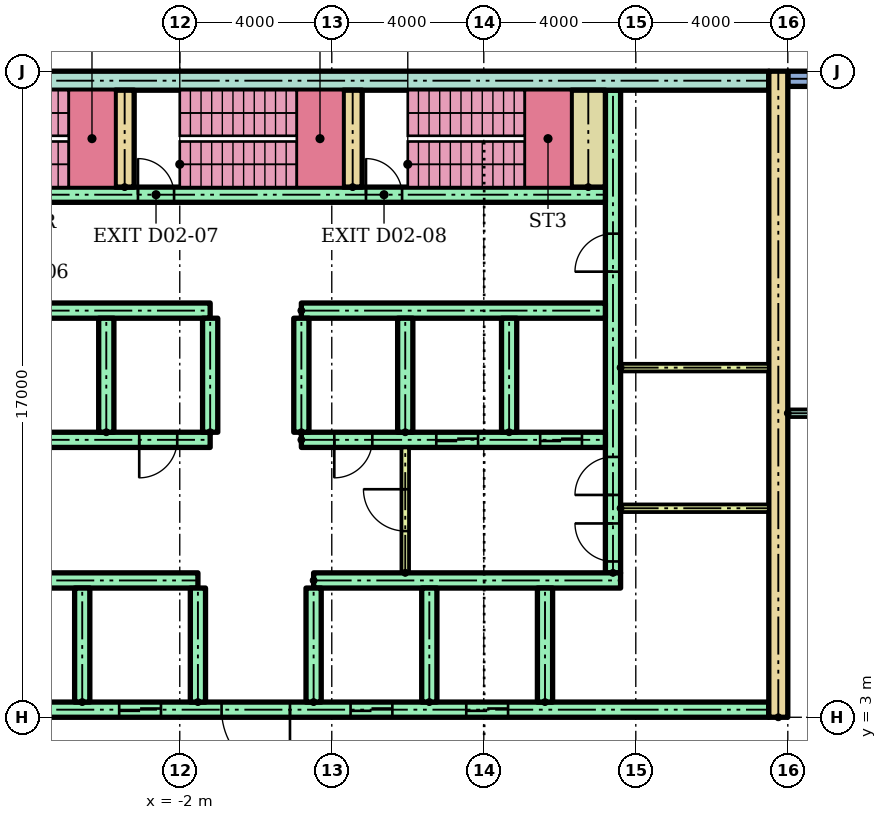
"""IFC4 building model, lengths in metres.
Left out: names, types, materials, properties, quantities, classifications, styles, units other than length and angle.
Written with IfcOpenShell. Run it as: python <this file> out.ifc"""

import sys

from ifc_helpers import new_model, si_unit, direction, frame, frame_2d, origin, place, context, subcontext, project, spatial, rectangle, extrude, element, fill, save


model = new_model("IFC4")
c1 = context("Model", 3, precision=1e-05, world=origin(), true_north=direction((0.0, 1.0)))
c2 = subcontext(c1, "Body", "Model", "MODEL_VIEW")
j1 = project(units=[si_unit("LENGTHUNIT", "METRE"), si_unit("PLANEANGLEUNIT", "RADIAN")], contexts=[c1])
p1 = place(None, origin())
s1 = spatial("IfcSite", under=j1, at=p1, CompositionType="ELEMENT")
p2 = place(p1, origin())
s2 = spatial("IfcBuilding", under=s1, at=p2, CompositionType="ELEMENT")
p3 = place(p2, frame((0.0, 0.0, 10.0)))
s3 = spatial("IfcBuildingStorey", under=s2, at=p3, CompositionType="ELEMENT", Elevation=10.0)
p4 = place(p3, frame((39.6, 19.8, 0.0), z_axis=(0.0, 0.0, 1.0), x_axis=(-1.0, 0.0, 0.0)))
e1 = element("IfcWall", 1, at=p4, inside=s3, PredefinedType="STANDARD", context=c2, shape_type="SweptSolid", body=[
    extrude(rectangle(XDim=25.6, YDim=0.4, at=frame_2d((12.8, 0.0))), origin(), (0.0, 0.0, 1.0), 3.7),
])
p5 = place(p4, frame((2.4, 0.0, 0.9)))
e2 = element("IfcOpeningElement", 2, at=p5, cuts=e1, PredefinedType="OPENING", context=c2, shape_type="SweptSolid", body=[
    extrude(rectangle(XDim=2.4, YDim=2.1, at=frame_2d((1.2, 1.05))), frame((0.0, 0.21, 0.0), z_axis=(0.0, -1.0, 0.0), x_axis=(1.0, 0.0, 0.0)), (0.0, 0.0, 1.0), 0.42),
])
p6 = place(p4, frame((10.135, 0.0, 0.9)))
e3 = element("IfcOpeningElement", 3, at=p6, cuts=e1, PredefinedType="OPENING", context=c2, shape_type="SweptSolid", body=[
    extrude(rectangle(XDim=2.4, YDim=2.1, at=frame_2d((1.2, 1.05))), frame((0.0, 0.21, 0.0), z_axis=(0.0, -1.0, 0.0), x_axis=(1.0, 0.0, 0.0)), (0.0, 0.0, 1.0), 0.42),
])
p7 = place(p4, frame((14.665, 0.0, 0.9)))
e4 = element("IfcOpeningElement", 4, at=p7, cuts=e1, PredefinedType="OPENING", context=c2, shape_type="SweptSolid", body=[
    extrude(rectangle(XDim=2.4, YDim=2.1, at=frame_2d((1.2, 1.05))), frame((0.0, 0.21, 0.0), z_axis=(0.0, -1.0, 0.0), x_axis=(1.0, 0.0, 0.0)), (0.0, 0.0, 1.0), 0.42),
])
p8 = place(p4, frame((18.135, 0.0, 0.9)))
e5 = element("IfcOpeningElement", 5, at=p8, cuts=e1, PredefinedType="OPENING", context=c2, shape_type="SweptSolid", body=[
    extrude(rectangle(XDim=2.4, YDim=2.1, at=frame_2d((1.2, 1.05))), frame((0.0, 0.21, 0.0), z_axis=(0.0, -1.0, 0.0), x_axis=(1.0, 0.0, 0.0)), (0.0, 0.0, 1.0), 0.42),
])
p9 = place(p4, frame((22.665, 0.0, 0.9)))
e6 = element("IfcOpeningElement", 6, at=p9, cuts=e1, PredefinedType="OPENING", context=c2, shape_type="SweptSolid", body=[
    extrude(rectangle(XDim=2.4, YDim=2.1, at=frame_2d((1.2, 1.05))), frame((0.0, 0.21, 0.0), z_axis=(0.0, -1.0, 0.0), x_axis=(1.0, 0.0, 0.0)), (0.0, 0.0, 1.0), 0.42),
])
p10 = place(p3, frame((13.75, 3.0, 0.0), z_axis=(0.0, 0.0, 1.0), x_axis=(0.0, 1.0, 0.0)))
e7 = element("IfcWall", 7, at=p10, inside=s3, PredefinedType="SHEAR", context=c2, shape_type="SweptSolid", body=[
    extrude(rectangle(XDim=17.0, YDim=0.5, at=frame_2d((8.5, 0.0))), origin(), (0.0, 0.0, 1.0), 3.7),
])
p11 = place(p3, frame((-13.5, 19.75, 0.0)))
e8 = element("IfcWall", 8, at=p11, inside=s3, PredefinedType="SHEAR", context=c2, shape_type="SweptSolid", body=[
    extrude(rectangle(XDim=27.0, YDim=0.5, at=frame_2d((13.5, 0.0))), origin(), (0.0, 0.0, 1.0), 3.7),
])
p12 = place(p3, frame((9.4, 6.8, 0.0), z_axis=(0.0, 0.0, 1.0), x_axis=(0.0, 1.0, 0.0)))
e9 = element("IfcWall", 9, at=p12, inside=s3, PredefinedType="SHEAR", context=c2, shape_type="SweptSolid", body=[
    extrude(rectangle(XDim=12.7, YDim=0.4, at=frame_2d((6.35, 0.0))), origin(), (0.0, 0.0, 1.0), 3.7),
])
p13 = place(p12, frame((0.3, 0.0, 0.0)))
e10 = element("IfcOpeningElement", 10, at=p13, cuts=e9, PredefinedType="OPENING", context=c2, shape_type="SweptSolid", body=[
    extrude(rectangle(XDim=1.0, YDim=2.1, at=frame_2d((0.5, 1.05))), frame((0.0, 0.21, 0.0), z_axis=(0.0, -1.0, 0.0), x_axis=(1.0, 0.0, 0.0)), (0.0, 0.0, 1.0), 0.42),
])
p14 = place(p12, frame((2.05, 0.0, 0.0)))
e11 = element("IfcOpeningElement", 11, at=p14, cuts=e9, PredefinedType="OPENING", context=c2, shape_type="SweptSolid", body=[
    extrude(rectangle(XDim=1.0, YDim=2.1, at=frame_2d((0.5, 1.05))), frame((0.0, 0.21, 0.0), z_axis=(0.0, -1.0, 0.0), x_axis=(1.0, 0.0, 0.0)), (0.0, 0.0, 1.0), 0.42),
])
p15 = place(p12, frame((7.925, 0.0, 0.0)))
e12 = element("IfcOpeningElement", 12, at=p15, cuts=e9, PredefinedType="OPENING", context=c2, shape_type="SweptSolid", body=[
    extrude(rectangle(XDim=1.0, YDim=2.1, at=frame_2d((0.5, 1.05))), frame((0.0, 0.21, 0.0), z_axis=(0.0, -1.0, 0.0), x_axis=(1.0, 0.0, 0.0)), (0.0, 0.0, 1.0), 0.42),
])
p16 = place(p3, frame((-13.5, 3.2, 0.0)))
e13 = element("IfcWall", 13, at=p16, inside=s3, PredefinedType="SHEAR", context=c2, shape_type="SweptSolid", body=[
    extrude(rectangle(XDim=27.0, YDim=0.4, at=frame_2d((13.5, 0.0))), origin(), (0.0, 0.0, 1.0), 3.7),
])
p17 = place(p16, frame((6.861, 0.0, 0.0)))
e14 = element("IfcOpeningElement", 14, at=p17, cuts=e13, PredefinedType="OPENING", context=c2, shape_type="SweptSolid", body=[
    extrude(rectangle(XDim=1.1, YDim=2.1, at=frame_2d((0.55, 1.05))), frame((0.0, 0.21, 0.0), z_axis=(0.0, -1.0, 0.0), x_axis=(1.0, 0.0, 0.0)), (0.0, 0.0, 1.0), 0.42),
])
p18 = place(p16, frame((9.906, 0.0, 0.0)))
e15 = element("IfcOpeningElement", 15, at=p18, cuts=e13, PredefinedType="OPENING", context=c2, shape_type="SweptSolid", body=[
    extrude(rectangle(XDim=1.1, YDim=2.1, at=frame_2d((0.55, 1.05))), frame((0.0, 0.21, 0.0), z_axis=(0.0, -1.0, 0.0), x_axis=(1.0, 0.0, 0.0)), (0.0, 0.0, 1.0), 0.42),
])
p19 = place(p16, frame((15.994, 0.0, 0.0)))
e16 = element("IfcOpeningElement", 16, at=p19, cuts=e13, PredefinedType="OPENING", context=c2, shape_type="SweptSolid", body=[
    extrude(rectangle(XDim=1.1, YDim=2.1, at=frame_2d((0.55, 1.05))), frame((0.0, 0.21, 0.0), z_axis=(0.0, -1.0, 0.0), x_axis=(1.0, 0.0, 0.0)), (0.0, 0.0, 1.0), 0.42),
])
p20 = place(p16, frame((19.039, 0.0, 0.0)))
e17 = element("IfcOpeningElement", 17, at=p20, cuts=e13, PredefinedType="OPENING", context=c2, shape_type="SweptSolid", body=[
    extrude(rectangle(XDim=1.1, YDim=2.1, at=frame_2d((0.55, 1.05))), frame((0.0, 0.21, 0.0), z_axis=(0.0, -1.0, 0.0), x_axis=(1.0, 0.0, 0.0)), (0.0, 0.0, 1.0), 0.42),
])
p21 = place(p16, frame((12.6, 0.0, 0.0)))
e18 = element("IfcOpeningElement", 18, at=p21, cuts=e13, PredefinedType="OPENING", context=c2, shape_type="SweptSolid", body=[
    extrude(rectangle(XDim=1.8, YDim=2.1, at=frame_2d((0.9, 1.05))), frame((0.0, 0.21, 0.0), z_axis=(0.0, -1.0, 0.0), x_axis=(1.0, 0.0, 0.0)), (0.0, 0.0, 1.0), 0.42),
])
p22 = place(p3, frame((-13.5, 6.6, 0.0)))
e19 = element("IfcWall", 19, at=p22, inside=s3, PredefinedType="SHEAR", context=c2, shape_type="SweptSolid", body=[
    extrude(rectangle(XDim=11.978, YDim=0.4, at=frame_2d((5.989, 0.0))), origin(), (0.0, 0.0, 1.0), 3.7),
])
p23 = place(p3, frame((1.522, 6.6, 0.0)))
e20 = element("IfcWall", 20, at=p23, inside=s3, PredefinedType="SHEAR", context=c2, shape_type="SweptSolid", body=[
    extrude(rectangle(XDim=8.078, YDim=0.4, at=frame_2d((4.039, 0.0))), origin(), (0.0, 0.0, 1.0), 3.7),
])
for number, where, z_axis, x_axis in (
    (21, (-4.567, 3.4, 0.0), (0.0, 0.0, 1.0), (0.0, 1.0, 0.0)),
    (22, (-1.522, 3.4, 0.0), (0.0, 0.0, 1.0), (0.0, 1.0, 0.0)),
    (23, (1.522, 3.4, 0.0), (0.0, 0.0, 1.0), (0.0, 1.0, 0.0)),
    (24, (4.567, 3.4, 0.0), (0.0, 0.0, 1.0), (0.0, 1.0, 0.0)),
    (25, (7.611, 3.4, 0.0), (0.0, 0.0, 1.0), (0.0, 1.0, 0.0)),
):
    element("IfcWall", number, at=place(p3, frame(where, z_axis=z_axis, x_axis=x_axis)), inside=s3, PredefinedType="SHEAR", context=c2, shape_type="SweptSolid", body=[
        extrude(rectangle(XDim=3.0, YDim=0.4, at=frame_2d((1.5, 0.0))), origin(), (0.0, 0.0, 1.0), 3.7),
    ])
p24 = place(p3, frame((-9.2, 10.3, 0.0)))
e26 = element("IfcWall", 26, at=p24, inside=s3, PredefinedType="SHEAR", context=c2, shape_type="SweptSolid", body=[
    extrude(rectangle(XDim=8.0, YDim=0.4, at=frame_2d((4.0, 0.0))), origin(), (0.0, 0.0, 1.0), 3.7),
])
p25 = place(p24, frame((2.033, 0.0, 0.0)))
e27 = element("IfcOpeningElement", 27, at=p25, cuts=e26, PredefinedType="OPENING", context=c2, shape_type="SweptSolid", body=[
    extrude(rectangle(XDim=1.0, YDim=2.1, at=frame_2d((0.5, 1.05))), frame((0.0, 0.21, 0.0), z_axis=(0.0, -1.0, 0.0), x_axis=(1.0, 0.0, 0.0)), (0.0, 0.0, 1.0), 0.42),
])
p26 = place(p24, frame((6.133, 0.0, 0.0)))
e28 = element("IfcOpeningElement", 28, at=p26, cuts=e26, PredefinedType="OPENING", context=c2, shape_type="SweptSolid", body=[
    extrude(rectangle(XDim=1.0, YDim=2.1, at=frame_2d((0.5, 1.05))), frame((0.0, 0.21, 0.0), z_axis=(0.0, -1.0, 0.0), x_axis=(1.0, 0.0, 0.0)), (0.0, 0.0, 1.0), 0.42),
])
p27 = place(p3, frame((-9.2, 13.7, 0.0)))
e29 = element("IfcWall", 29, at=p27, inside=s3, PredefinedType="SHEAR", context=c2, shape_type="SweptSolid", body=[
    extrude(rectangle(XDim=8.0, YDim=0.4, at=frame_2d((4.0, 0.0))), origin(), (0.0, 0.0, 1.0), 3.7),
])
p28 = place(p3, frame((1.2, 10.3, 0.0)))
e30 = element("IfcWall", 30, at=p28, inside=s3, PredefinedType="SHEAR", context=c2, shape_type="SweptSolid", body=[
    extrude(rectangle(XDim=8.0, YDim=0.4, at=frame_2d((4.0, 0.0))), origin(), (0.0, 0.0, 1.0), 3.7),
])
p29 = place(p28, frame((3.55, 0.0, 0.0)))
e31 = element("IfcOpeningElement", 31, at=p29, cuts=e30, PredefinedType="OPENING", context=c2, shape_type="SweptSolid", body=[
    extrude(rectangle(XDim=1.1, YDim=2.1, at=frame_2d((0.55, 1.05))), frame((0.0, 0.21, 0.0), z_axis=(0.0, -1.0, 0.0), x_axis=(1.0, 0.0, 0.0)), (0.0, 0.0, 1.0), 0.42),
])
p30 = place(p28, frame((6.283, 0.0, 0.0)))
e32 = element("IfcOpeningElement", 32, at=p30, cuts=e30, PredefinedType="OPENING", context=c2, shape_type="SweptSolid", body=[
    extrude(rectangle(XDim=1.1, YDim=2.1, at=frame_2d((0.55, 1.05))), frame((0.0, 0.21, 0.0), z_axis=(0.0, -1.0, 0.0), x_axis=(1.0, 0.0, 0.0)), (0.0, 0.0, 1.0), 0.42),
])
p31 = place(p28, frame((0.867, 0.0, 0.0)))
e33 = element("IfcOpeningElement", 33, at=p31, cuts=e30, PredefinedType="OPENING", context=c2, shape_type="SweptSolid", body=[
    extrude(rectangle(XDim=1.0, YDim=2.1, at=frame_2d((0.5, 1.05))), frame((0.0, 0.21, 0.0), z_axis=(0.0, -1.0, 0.0), x_axis=(1.0, 0.0, 0.0)), (0.0, 0.0, 1.0), 0.42),
])
p32 = place(p3, frame((1.2, 13.7, 0.0)))
e34 = element("IfcWall", 34, at=p32, inside=s3, PredefinedType="SHEAR", context=c2, shape_type="SweptSolid", body=[
    extrude(rectangle(XDim=8.0, YDim=0.4, at=frame_2d((4.0, 0.0))), origin(), (0.0, 0.0, 1.0), 3.7),
])
for number, where, z_axis, x_axis in (
    (35, (-3.933, 10.5, 0.0), (0.0, 0.0, 1.0), (0.0, 1.0, 0.0)),
    (36, (-1.2, 10.5, 0.0), (0.0, 0.0, 1.0), (0.0, 1.0, 0.0)),
    (37, (1.2, 10.5, 0.0), (0.0, 0.0, 1.0), (0.0, 1.0, 0.0)),
    (38, (3.933, 10.5, 0.0), (0.0, 0.0, 1.0), (0.0, 1.0, 0.0)),
    (39, (6.667, 10.5, 0.0), (0.0, 0.0, 1.0), (0.0, 1.0, 0.0)),
):
    element("IfcWall", number, at=place(p3, frame(where, z_axis=z_axis, x_axis=x_axis)), inside=s3, PredefinedType="SHEAR", context=c2, shape_type="SweptSolid", body=[
        extrude(rectangle(XDim=3.0, YDim=0.4, at=frame_2d((1.5, 0.0))), origin(), (0.0, 0.0, 1.0), 3.7),
    ])
p33 = place(p3, frame((3.933, 6.8, 0.0), z_axis=(0.0, 0.0, 1.0), x_axis=(0.0, 1.0, 0.0)))
e40 = element("IfcWall", 40, at=p33, inside=s3, PredefinedType="PARTITIONING", context=c2, shape_type="SweptSolid", body=[
    extrude(rectangle(XDim=3.3, YDim=0.2, at=frame_2d((1.65, 0.0))), origin(), (0.0, 0.0, 1.0), 3.7),
])
p34 = place(p33, frame((1.1, 0.0, 0.0)))
e41 = element("IfcOpeningElement", 41, at=p34, cuts=e40, PredefinedType="OPENING", context=c2, shape_type="SweptSolid", body=[
    extrude(rectangle(XDim=1.1, YDim=2.1, at=frame_2d((0.55, 1.05))), frame((0.0, 0.11, 0.0), z_axis=(0.0, -1.0, 0.0), x_axis=(1.0, 0.0, 0.0)), (0.0, 0.0, 1.0), 0.22),
])
p35 = place(p3, frame((-9.2, 16.75, 0.0)))
e42 = element("IfcWall", 42, at=p35, inside=s3, PredefinedType="SHEAR", context=c2, shape_type="SweptSolid", body=[
    extrude(rectangle(XDim=18.4, YDim=0.4, at=frame_2d((9.2, 0.0))), origin(), (0.0, 0.0, 1.0), 3.7),
])
p36 = place(p35, frame((0.1, 0.0, 0.0)))
e43 = element("IfcOpeningElement", 43, at=p36, cuts=e42, PredefinedType="OPENING", context=c2, shape_type="SweptSolid", body=[
    extrude(rectangle(XDim=0.95, YDim=2.1, at=frame_2d((0.475, 1.05))), frame((0.0, 0.21, 0.0), z_axis=(0.0, -1.0, 0.0), x_axis=(1.0, 0.0, 0.0)), (0.0, 0.0, 1.0), 0.42),
])
p37 = place(p35, frame((6.1, 0.0, 0.0)))
e44 = element("IfcOpeningElement", 44, at=p37, cuts=e42, PredefinedType="OPENING", context=c2, shape_type="SweptSolid", body=[
    extrude(rectangle(XDim=0.95, YDim=2.1, at=frame_2d((0.475, 1.05))), frame((0.0, 0.21, 0.0), z_axis=(0.0, -1.0, 0.0), x_axis=(1.0, 0.0, 0.0)), (0.0, 0.0, 1.0), 0.42),
])
p38 = place(p35, frame((12.1, 0.0, 0.0)))
e45 = element("IfcOpeningElement", 45, at=p38, cuts=e42, PredefinedType="OPENING", context=c2, shape_type="SweptSolid", body=[
    extrude(rectangle(XDim=0.95, YDim=2.1, at=frame_2d((0.475, 1.05))), frame((0.0, 0.21, 0.0), z_axis=(0.0, -1.0, 0.0), x_axis=(1.0, 0.0, 0.0)), (0.0, 0.0, 1.0), 0.42),
])
for number, where, z_axis, x_axis in (
    (46, (-3.45, 16.95, 0.0), (0.0, 0.0, 1.0), (0.0, 1.0, 0.0)),
    (47, (2.55, 16.95, 0.0), (0.0, 0.0, 1.0), (0.0, 1.0, 0.0)),
):
    element("IfcWall", number, at=place(p3, frame(where, z_axis=z_axis, x_axis=x_axis)), inside=s3, PredefinedType="SHEAR", context=c2, shape_type="SweptSolid", body=[
        extrude(rectangle(XDim=2.55, YDim=0.5, at=frame_2d((1.275, 0.0))), origin(), (0.0, 0.0, 1.0), 3.7),
    ])
p39 = place(p3, frame((8.75, 16.95, 0.0), z_axis=(0.0, 0.0, 1.0), x_axis=(0.0, 1.0, 0.0)))
e48 = element("IfcWall", 48, at=p39, inside=s3, PredefinedType="SHEAR", context=c2, shape_type="SweptSolid", body=[
    extrude(rectangle(XDim=2.55, YDim=0.9, at=frame_2d((1.275, 0.0))), origin(), (0.0, 0.0, 1.0), 3.7),
])
for number, where in (
    (49, (9.6, 8.5, 0.0)),
    (50, (9.6, 12.2, 0.0)),
):
    element("IfcWall", number, at=place(p3, frame(where)), inside=s3, PredefinedType="PARTITIONING", context=c2, shape_type="SweptSolid", body=[
        extrude(rectangle(XDim=3.9, YDim=0.2, at=frame_2d((1.95, 0.0))), origin(), (0.0, 0.0, 1.0), 3.7),
    ])
p40 = place(p3, frame((14.0, 11.0, 0.0)))
e51 = element("IfcWall", 51, at=p40, inside=s3, PredefinedType="PARTITIONING", context=c2, shape_type="SweptSolid", body=[
    extrude(rectangle(XDim=3.5, YDim=0.2, at=frame_2d((1.75, 0.0))), origin(), (0.0, 0.0, 1.0), 3.7),
])
p41 = place(p18, origin())
e52 = element("IfcDoor", 52, at=p41, inside=s3, OperationType="SLIDING_TO_LEFT", PredefinedType="DOOR", context=c2, shape_type="SweptSolid", body=[
    extrude(rectangle(XDim=1.1, YDim=2.1, at=frame_2d((0.55, 1.05))), frame((0.0, 0.025, 0.0), z_axis=(0.0, -1.0, 0.0), x_axis=(1.0, 0.0, 0.0)), (0.0, 0.0, 1.0), 0.05),
])
fill(e15, e52)
p42 = place(p19, origin())
e53 = element("IfcDoor", 53, at=p42, inside=s3, OperationType="SLIDING_TO_LEFT", PredefinedType="DOOR", context=c2, shape_type="SweptSolid", body=[
    extrude(rectangle(XDim=1.1, YDim=2.1, at=frame_2d((0.55, 1.05))), frame((0.0, 0.025, 0.0), z_axis=(0.0, -1.0, 0.0), x_axis=(1.0, 0.0, 0.0)), (0.0, 0.0, 1.0), 0.05),
])
fill(e16, e53)
p43 = place(p20, origin())
e54 = element("IfcDoor", 54, at=p43, inside=s3, OperationType="SLIDING_TO_LEFT", PredefinedType="DOOR", context=c2, shape_type="SweptSolid", body=[
    extrude(rectangle(XDim=1.1, YDim=2.1, at=frame_2d((0.55, 1.05))), frame((0.0, 0.025, 0.0), z_axis=(0.0, -1.0, 0.0), x_axis=(1.0, 0.0, 0.0)), (0.0, 0.0, 1.0), 0.05),
])
fill(e17, e54)
p44 = place(p21, frame((1.8, 0.0, 0.0), z_axis=(0.0, 0.0, 1.0), x_axis=(-1.0, 0.0, 0.0)))
e55 = element("IfcDoor", 55, at=p44, inside=s3, OperationType="DOUBLE_DOOR_SINGLE_SWING", PredefinedType="DOOR", context=c2, shape_type="SweptSolid", body=[
    extrude(rectangle(XDim=1.8, YDim=2.1, at=frame_2d((0.9, 1.05))), frame((0.0, 0.025, 0.0), z_axis=(0.0, -1.0, 0.0), x_axis=(1.0, 0.0, 0.0)), (0.0, 0.0, 1.0), 0.05),
])
fill(e18, e55)
p45 = place(p29, origin())
e56 = element("IfcDoor", 56, at=p45, inside=s3, OperationType="SLIDING_TO_LEFT", PredefinedType="DOOR", context=c2, shape_type="SweptSolid", body=[
    extrude(rectangle(XDim=1.1, YDim=2.1, at=frame_2d((0.55, 1.05))), frame((0.0, 0.025, 0.0), z_axis=(0.0, -1.0, 0.0), x_axis=(1.0, 0.0, 0.0)), (0.0, 0.0, 1.0), 0.05),
])
fill(e31, e56)
p46 = place(p30, origin())
e57 = element("IfcDoor", 57, at=p46, inside=s3, OperationType="SLIDING_TO_LEFT", PredefinedType="DOOR", context=c2, shape_type="SweptSolid", body=[
    extrude(rectangle(XDim=1.1, YDim=2.1, at=frame_2d((0.55, 1.05))), frame((0.0, 0.025, 0.0), z_axis=(0.0, -1.0, 0.0), x_axis=(1.0, 0.0, 0.0)), (0.0, 0.0, 1.0), 0.05),
])
fill(e32, e57)
p47 = place(p26, frame((1.0, 0.0, 0.0), z_axis=(0.0, 0.0, 1.0), x_axis=(-1.0, 0.0, 0.0)))
e58 = element("IfcDoor", 58, at=p47, inside=s3, OperationType="SINGLE_SWING_LEFT", PredefinedType="DOOR", context=c2, shape_type="SweptSolid", body=[
    extrude(rectangle(XDim=1.0, YDim=2.1, at=frame_2d((0.5, 1.05))), frame((0.0, 0.025, 0.0), z_axis=(0.0, -1.0, 0.0), x_axis=(1.0, 0.0, 0.0)), (0.0, 0.0, 1.0), 0.05),
])
fill(e28, e58)
p48 = place(p31, frame((1.0, 0.0, 0.0), z_axis=(0.0, 0.0, 1.0), x_axis=(-1.0, 0.0, 0.0)))
e59 = element("IfcDoor", 59, at=p48, inside=s3, OperationType="SINGLE_SWING_LEFT", PredefinedType="DOOR", context=c2, shape_type="SweptSolid", body=[
    extrude(rectangle(XDim=1.0, YDim=2.1, at=frame_2d((0.5, 1.05))), frame((0.0, 0.025, 0.0), z_axis=(0.0, -1.0, 0.0), x_axis=(1.0, 0.0, 0.0)), (0.0, 0.0, 1.0), 0.05),
])
fill(e33, e59)
p49 = place(p34, origin())
e60 = element("IfcDoor", 60, at=p49, inside=s3, OperationType="SINGLE_SWING_RIGHT", PredefinedType="DOOR", context=c2, shape_type="SweptSolid", body=[
    extrude(rectangle(XDim=1.1, YDim=2.1, at=frame_2d((0.55, 1.05))), frame((0.0, 0.025, 0.0), z_axis=(0.0, -1.0, 0.0), x_axis=(1.0, 0.0, 0.0)), (0.0, 0.0, 1.0), 0.05),
])
fill(e41, e60)
p50 = place(p37, origin())
e61 = element("IfcDoor", 61, at=p50, inside=s3, OperationType="SINGLE_SWING_LEFT", PredefinedType="DOOR", context=c2, shape_type="SweptSolid", body=[
    extrude(rectangle(XDim=0.95, YDim=2.1, at=frame_2d((0.475, 1.05))), frame((0.0, 0.025, 0.0), z_axis=(0.0, -1.0, 0.0), x_axis=(1.0, 0.0, 0.0)), (0.0, 0.0, 1.0), 0.05),
])
fill(e44, e61)
p51 = place(p38, origin())
e62 = element("IfcDoor", 62, at=p51, inside=s3, OperationType="SINGLE_SWING_LEFT", PredefinedType="DOOR", context=c2, shape_type="SweptSolid", body=[
    extrude(rectangle(XDim=0.95, YDim=2.1, at=frame_2d((0.475, 1.05))), frame((0.0, 0.025, 0.0), z_axis=(0.0, -1.0, 0.0), x_axis=(1.0, 0.0, 0.0)), (0.0, 0.0, 1.0), 0.05),
])
fill(e45, e62)
p52 = place(p13, origin())
e63 = element("IfcDoor", 63, at=p52, inside=s3, OperationType="SINGLE_SWING_RIGHT", PredefinedType="DOOR", context=c2, shape_type="SweptSolid", body=[
    extrude(rectangle(XDim=1.0, YDim=2.1, at=frame_2d((0.5, 1.05))), frame((0.0, 0.025, 0.0), z_axis=(0.0, -1.0, 0.0), x_axis=(1.0, 0.0, 0.0)), (0.0, 0.0, 1.0), 0.05),
])
fill(e10, e63)
p53 = place(p14, origin())
e64 = element("IfcDoor", 64, at=p53, inside=s3, OperationType="SINGLE_SWING_LEFT", PredefinedType="DOOR", context=c2, shape_type="SweptSolid", body=[
    extrude(rectangle(XDim=1.0, YDim=2.1, at=frame_2d((0.5, 1.05))), frame((0.0, 0.025, 0.0), z_axis=(0.0, -1.0, 0.0), x_axis=(1.0, 0.0, 0.0)), (0.0, 0.0, 1.0), 0.05),
])
fill(e11, e64)
p54 = place(p15, origin())
e65 = element("IfcDoor", 65, at=p54, inside=s3, OperationType="SINGLE_SWING_LEFT", PredefinedType="DOOR", context=c2, shape_type="SweptSolid", body=[
    extrude(rectangle(XDim=1.0, YDim=2.1, at=frame_2d((0.5, 1.05))), frame((0.0, 0.025, 0.0), z_axis=(0.0, -1.0, 0.0), x_axis=(1.0, 0.0, 0.0)), (0.0, 0.0, 1.0), 0.05),
])
fill(e12, e65)
save(model, sys.argv[1])
